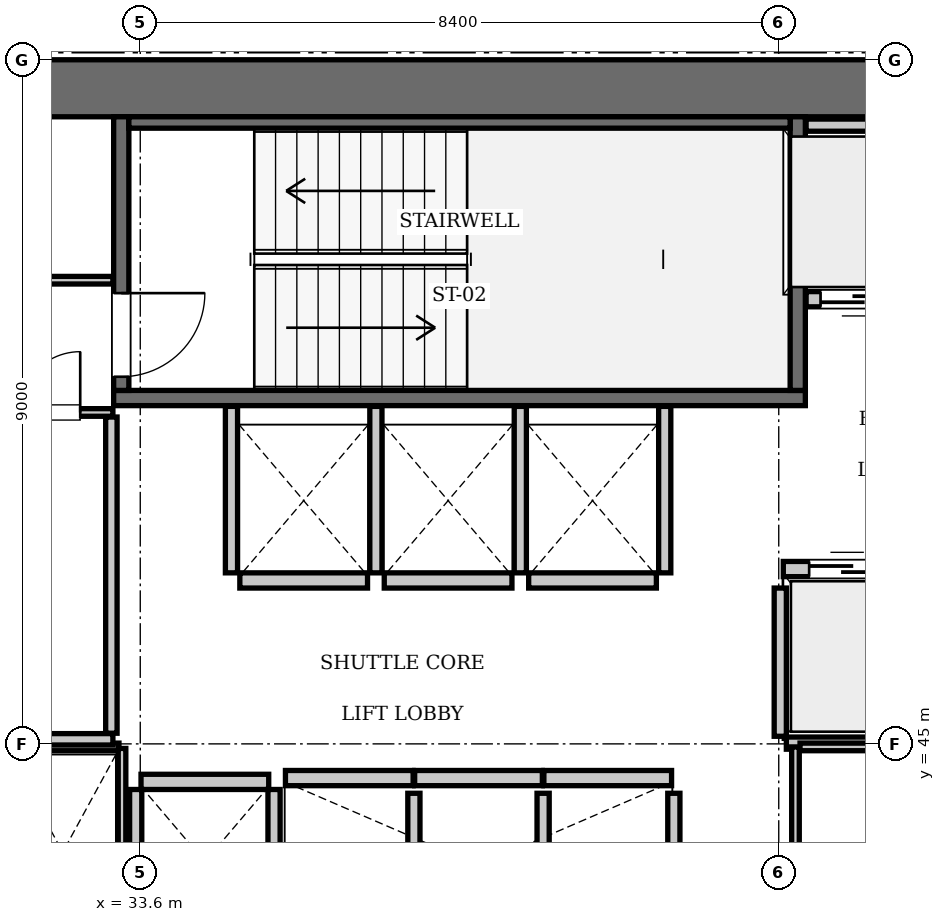
"""IFC4 building model, lengths in metres.
Left out: names, types, materials, properties, quantities, classifications, styles, units other than length and angle.
Written with IfcOpenShell. Run it as: python <this file> out.ifc"""

import sys

from ifc_helpers import new_model, si_unit, direction, frame, frame_2d, origin, place, context, subcontext, project, spatial, rectangle, extrude, element, fill, save


model = new_model("IFC4")
c1 = context("Model", 3, precision=1e-05, world=origin(), true_north=direction((0.0, 1.0)))
c2 = subcontext(c1, "Body", "Model", "MODEL_VIEW")
j1 = project(units=[si_unit("LENGTHUNIT", "METRE"), si_unit("PLANEANGLEUNIT", "RADIAN")], contexts=[c1])
p1 = place(None, origin())
s1 = spatial("IfcSite", under=j1, at=p1, CompositionType="ELEMENT")
p2 = place(p1, origin())
s2 = spatial("IfcBuilding", under=s1, at=p2, CompositionType="ELEMENT")
p3 = place(p2, frame((0.0, 0.0, 142.8)))
s3 = spatial("IfcBuildingStorey", under=s2, at=p3, CompositionType="ELEMENT", Elevation=142.8)
p4 = place(p3, frame((25.2, 53.625, 0.0), z_axis=(0.0, 0.0, 1.0), x_axis=(1.0, 0.0, 0.0)))
e1 = element("IfcWall", 1, at=p4, inside=s3, PredefinedType="SHEAR", context=c2, shape_type="SweptSolid", body=[
    extrude(rectangle(XDim=25.2, YDim=0.75, at=frame_2d((12.6, 0.0))), origin(), (0.0, 0.0, 1.0), 3.85),
])
p5 = place(p3, frame((33.25, 49.55, 0.0), z_axis=(0.0, 0.0, 1.0), x_axis=(1.0, 0.0, 0.0)))
e2 = element("IfcWall", 2, at=p5, inside=s3, PredefinedType="SOLIDWALL", context=c2, shape_type="SweptSolid", body=[
    extrude(rectangle(XDim=9.1, YDim=0.2, at=frame_2d((4.55, 0.0))), origin(), (0.0, 0.0, 1.0), 3.61),
])
p6 = place(p3, frame((42.25, 49.65, 0.0), z_axis=(0.0, 0.0, 1.0), x_axis=(0.0, 1.0, 0.0)))
e3 = element("IfcWall", 3, at=p6, inside=s3, PredefinedType="SOLIDWALL", context=c2, shape_type="SweptSolid", body=[
    extrude(rectangle(XDim=3.6, YDim=0.2, at=frame_2d((1.8, 0.0))), origin(), (0.0, 0.0, 1.0), 3.61),
])
p7 = place(p3, frame((33.35, 49.65, 0.0), z_axis=(0.0, 0.0, 1.0), x_axis=(0.0, 1.0, 0.0)))
e4 = element("IfcWall", 4, at=p7, inside=s3, PredefinedType="SOLIDWALL", context=c2, shape_type="SweptSolid", body=[
    extrude(rectangle(XDim=3.6, YDim=0.2, at=frame_2d((1.8, 0.0))), origin(), (0.0, 0.0, 1.0), 3.61),
])
p8 = place(p7, frame((0.18, 0.0, 0.0)))
e5 = element("IfcOpeningElement", 5, at=p8, cuts=e4, PredefinedType="OPENING", context=c2, shape_type="SweptSolid", body=[
    extrude(rectangle(XDim=1.1, YDim=2.15, at=frame_2d((0.55, 1.075))), frame((0.0, 0.11, 0.0), z_axis=(0.0, -1.0, 0.0), x_axis=(1.0, 0.0, 0.0)), (0.0, 0.0, 1.0), 0.22),
])
p9 = place(p3, frame((33.45, 53.175, 0.0), z_axis=(0.0, 0.0, 1.0), x_axis=(1.0, 0.0, 0.0)))
e6 = element("IfcWall", 6, at=p9, inside=s3, PredefinedType="SOLIDWALL", context=c2, shape_type="SweptSolid", body=[
    extrude(rectangle(XDim=8.7, YDim=0.15, at=frame_2d((4.35, 0.0))), origin(), (0.0, 0.0, 1.0), 3.61),
])
p10 = place(p3, frame((42.06, 47.3, 0.0), z_axis=(0.0, 0.0, 1.0), x_axis=(1.0, 0.0, 0.0)))
e7 = element("IfcWall", 7, at=p10, inside=s3, PredefinedType="SOLIDWALL", context=c2, shape_type="SweptSolid", body=[
    extrude(rectangle(XDim=1.68, YDim=0.2, at=frame_2d((0.84, 0.0))), origin(), (0.0, 0.0, 1.0), 3.61),
])
p11 = place(p10, frame((0.34, 0.0, 0.0)))
e8 = element("IfcOpeningElement", 8, at=p11, cuts=e7, PredefinedType="OPENING", context=c2, shape_type="SweptSolid", body=[
    extrude(rectangle(XDim=1.0, YDim=2.15, at=frame_2d((0.5, 1.075))), frame((0.0, 0.11, 0.0), z_axis=(0.0, -1.0, 0.0), x_axis=(1.0, 0.0, 0.0)), (0.0, 0.0, 1.0), 0.22),
])
p12 = place(p3, frame((42.36, 50.85, 0.0), z_axis=(0.0, 0.0, 1.0), x_axis=(1.0, 0.0, 0.0)))
e9 = element("IfcWall", 9, at=p12, inside=s3, PredefinedType="SOLIDWALL", context=c2, shape_type="SweptSolid", body=[
    extrude(rectangle(XDim=1.38, YDim=0.2, at=frame_2d((0.69, 0.0))), origin(), (0.0, 0.0, 1.0), 3.61),
])
p13 = place(p12, frame((0.19, 0.0, 0.0)))
e10 = element("IfcOpeningElement", 10, at=p13, cuts=e9, PredefinedType="OPENING", context=c2, shape_type="SweptSolid", body=[
    extrude(rectangle(XDim=1.0, YDim=2.15, at=frame_2d((0.5, 1.075))), frame((0.0, 0.11, 0.0), z_axis=(0.0, -1.0, 0.0), x_axis=(1.0, 0.0, 0.0)), (0.0, 0.0, 1.0), 0.22),
])
for number, where, z_axis, x_axis in (
    (11, (35.51, 44.55, 0.0), (0.0, 0.0, 1.0), (1.0, 0.0, 0.0)),
    (12, (37.21, 44.55, 0.0), (0.0, 0.0, 1.0), (1.0, 0.0, 0.0)),
):
    element("IfcWall", number, at=place(p3, frame(where, z_axis=z_axis, x_axis=x_axis)), inside=s3, PredefinedType="SOLIDWALL", context=c2, shape_type="SweptSolid", body=[
        extrude(rectangle(XDim=1.68, YDim=0.2, at=frame_2d((0.84, 0.0))), origin(), (0.0, 0.0, 1.0), 3.61),
    ])
for number, where, z_axis, x_axis in (
    (13, (38.91, 44.55, 0.0), (0.0, 0.0, 1.0), (1.0, 0.0, 0.0)),
    (14, (34.91, 47.15, 0.0), (0.0, 0.0, 1.0), (1.0, 0.0, 0.0)),
):
    element("IfcWall", number, at=place(p3, frame(where, z_axis=z_axis, x_axis=x_axis)), inside=s3, PredefinedType="SOLIDWALL", context=c2, shape_type="SweptSolid", body=[
        extrude(rectangle(XDim=1.68, YDim=0.2, at=frame_2d((0.84, 0.0))), origin(), (0.0, 0.0, 1.0), 3.61),
    ])
for number, where, z_axis, x_axis in (
    (15, (36.81, 47.15, 0.0), (0.0, 0.0, 1.0), (1.0, 0.0, 0.0)),
    (16, (38.71, 47.15, 0.0), (0.0, 0.0, 1.0), (1.0, 0.0, 0.0)),
    (17, (33.61, 44.5, 0.0), (0.0, 0.0, 1.0), (1.0, 0.0, 0.0)),
):
    element("IfcWall", number, at=place(p3, frame(where, z_axis=z_axis, x_axis=x_axis)), inside=s3, PredefinedType="SOLIDWALL", context=c2, shape_type="SweptSolid", body=[
        extrude(rectangle(XDim=1.68, YDim=0.2, at=frame_2d((0.84, 0.0))), origin(), (0.0, 0.0, 1.0), 3.61),
    ])
p14 = place(p3, frame((42.02, 45.1, 0.0), z_axis=(0.0, 0.0, 1.0), x_axis=(0.0, 1.0, 0.0)))
e18 = element("IfcWall", 18, at=p14, inside=s3, PredefinedType="SOLIDWALL", context=c2, shape_type="SweptSolid", body=[
    extrude(rectangle(XDim=1.95, YDim=0.16, at=frame_2d((0.975, 0.0))), origin(), (0.0, 0.0, 1.0), 3.61),
])
p15 = place(p3, frame((42.1, 45.01, 0.0), z_axis=(0.0, 0.0, 1.0), x_axis=(1.0, 0.0, 0.0)))
e19 = element("IfcWall", 19, at=p15, inside=s3, PredefinedType="SOLIDWALL", context=c2, shape_type="SweptSolid", body=[
    extrude(rectangle(XDim=3.45, YDim=0.16, at=frame_2d((1.725, 0.0))), origin(), (0.0, 0.0, 1.0), 3.61),
])
p16 = place(p3, frame((42.36, 53.14, 0.0), z_axis=(0.0, 0.0, 1.0), x_axis=(1.0, 0.0, 0.0)))
e20 = element("IfcWall", 20, at=p16, inside=s3, PredefinedType="SOLIDWALL", context=c2, shape_type="SweptSolid", body=[
    extrude(rectangle(XDim=3.14, YDim=0.16, at=frame_2d((1.57, 0.0))), origin(), (0.0, 0.0, 1.0), 3.61),
])
for number, where, z_axis, x_axis in (
    (21, (37.2, 42.15, 0.0), (0.0, 0.0, 1.0), (0.0, 1.0, 0.0)),
    (22, (38.9, 42.15, 0.0), (0.0, 0.0, 1.0), (0.0, 1.0, 0.0)),
    (23, (40.62, 42.15, 0.0), (0.0, 0.0, 1.0), (0.0, 1.0, 0.0)),
):
    element("IfcWall", number, at=place(p3, frame(where, z_axis=z_axis, x_axis=x_axis)), inside=s3, PredefinedType="SOLIDWALL", context=c2, shape_type="SweptSolid", body=[
        extrude(rectangle(XDim=2.2, YDim=0.16, at=frame_2d((1.1, 0.0))), origin(), (0.0, 0.0, 1.0), 3.61),
    ])
for number, where, z_axis, x_axis in (
    (24, (34.8, 47.25, 0.0), (0.0, 0.0, 1.0), (0.0, 1.0, 0.0)),
    (25, (36.7, 47.25, 0.0), (0.0, 0.0, 1.0), (0.0, 1.0, 0.0)),
    (26, (38.6, 47.25, 0.0), (0.0, 0.0, 1.0), (0.0, 1.0, 0.0)),
    (27, (40.5, 47.25, 0.0), (0.0, 0.0, 1.0), (0.0, 1.0, 0.0)),
):
    element("IfcWall", number, at=place(p3, frame(where, z_axis=z_axis, x_axis=x_axis)), inside=s3, PredefinedType="SOLIDWALL", context=c2, shape_type="SweptSolid", body=[
        extrude(rectangle(XDim=2.19, YDim=0.16, at=frame_2d((1.095, 0.0))), origin(), (0.0, 0.0, 1.0), 3.61),
    ])
for number, where, z_axis, x_axis in (
    (28, (33.54, 42.15, 0.0), (0.0, 0.0, 1.0), (0.0, 1.0, 0.0)),
    (29, (35.36, 42.15, 0.0), (0.0, 0.0, 1.0), (0.0, 1.0, 0.0)),
):
    element("IfcWall", number, at=place(p3, frame(where, z_axis=z_axis, x_axis=x_axis)), inside=s3, PredefinedType="SOLIDWALL", context=c2, shape_type="SweptSolid", body=[
        extrude(rectangle(XDim=2.25, YDim=0.16, at=frame_2d((1.125, 0.0))), origin(), (0.0, 0.0, 1.0), 3.61),
    ])
p17 = place(p3, frame((31.84, 44.96, 0.0), z_axis=(0.0, 0.0, 1.0), x_axis=(1.0, 0.0, 0.0)))
e30 = element("IfcWall", 30, at=p17, inside=s3, PredefinedType="PARTITIONING", context=c2, shape_type="SweptSolid", body=[
    extrude(rectangle(XDim=1.48, YDim=0.1, at=frame_2d((0.74, 0.0))), origin(), (0.0, 0.0, 1.0), 3.61),
])
p18 = place(p3, frame((33.36, 42.21, 0.0), z_axis=(0.0, 0.0, 1.0), x_axis=(0.0, 1.0, 0.0)))
e31 = element("IfcWall", 31, at=p18, inside=s3, PredefinedType="PARTITIONING", context=c2, shape_type="SweptSolid", body=[
    extrude(rectangle(XDim=2.73, YDim=0.1, at=frame_2d((1.365, 0.0))), origin(), (0.0, 0.0, 1.0), 3.61),
])
p19 = place(p3, frame((42.22, 42.2, 0.0), z_axis=(0.0, 0.0, 1.0), x_axis=(0.0, 1.0, 0.0)))
e32 = element("IfcWall", 32, at=p19, inside=s3, PredefinedType="PARTITIONING", context=c2, shape_type="SweptSolid", body=[
    extrude(rectangle(XDim=2.76, YDim=0.1, at=frame_2d((1.38, 0.0))), origin(), (0.0, 0.0, 1.0), 3.61),
])
p20 = place(p19, frame((0.65, 0.0, 0.0)))
e33 = element("IfcOpeningElement", 33, at=p20, cuts=e32, PredefinedType="OPENING", context=c2, shape_type="SweptSolid", body=[
    extrude(rectangle(XDim=0.8, YDim=2.05, at=frame_2d((0.4, 1.025))), frame((0.0, 0.06, 0.0), z_axis=(0.0, -1.0, 0.0), x_axis=(1.0, 0.0, 0.0)), (0.0, 0.0, 1.0), 0.12),
])
p21 = place(p3, frame((42.28, 44.96, 0.0), z_axis=(0.0, 0.0, 1.0), x_axis=(1.0, 0.0, 0.0)))
e34 = element("IfcWall", 34, at=p21, inside=s3, PredefinedType="PARTITIONING", context=c2, shape_type="SweptSolid", body=[
    extrude(rectangle(XDim=1.3, YDim=0.1, at=frame_2d((0.65, 0.0))), origin(), (0.0, 0.0, 1.0), 3.61),
])
p22 = place(p3, frame((30.06, 45.06, 0.0), z_axis=(0.0, 0.0, 1.0), x_axis=(1.0, 0.0, 0.0)))
e35 = element("IfcWall", 35, at=p22, inside=s3, PredefinedType="PARTITIONING", context=c2, shape_type="SweptSolid", body=[
    extrude(rectangle(XDim=3.18, YDim=0.15, at=frame_2d((1.59, 0.0))), origin(), (0.0, 0.0, 1.0), 3.61),
])
p23 = place(p3, frame((33.22, 45.14, 0.0), z_axis=(0.0, 0.0, 1.0), x_axis=(0.0, 1.0, 0.0)))
e36 = element("IfcWall", 36, at=p23, inside=s3, PredefinedType="PARTITIONING", context=c2, shape_type="SweptSolid", body=[
    extrude(rectangle(XDim=4.16, YDim=0.15, at=frame_2d((2.08, 0.0))), origin(), (0.0, 0.0, 1.0), 3.61),
])
p24 = place(p3, frame((30.06, 49.36, 0.0), z_axis=(0.0, 0.0, 1.0), x_axis=(1.0, 0.0, 0.0)))
e37 = element("IfcWall", 37, at=p24, inside=s3, PredefinedType="PARTITIONING", context=c2, shape_type="SweptSolid", body=[
    extrude(rectangle(XDim=3.18, YDim=0.1, at=frame_2d((1.59, 0.0))), origin(), (0.0, 0.0, 1.0), 3.61),
])
p25 = place(p24, frame((1.95, 0.0, 0.0)))
e38 = element("IfcOpeningElement", 38, at=p25, cuts=e37, PredefinedType="OPENING", context=c2, shape_type="SweptSolid", body=[
    extrude(rectangle(XDim=0.8, YDim=2.05, at=frame_2d((0.4, 1.025))), frame((0.0, 0.06, 0.0), z_axis=(0.0, -1.0, 0.0), x_axis=(1.0, 0.0, 0.0)), (0.0, 0.0, 1.0), 0.12),
])
p26 = place(p3, frame((31.82, 51.1, 0.0), z_axis=(0.0, 0.0, 1.0), x_axis=(1.0, 0.0, 0.0)))
e39 = element("IfcWall", 39, at=p26, inside=s3, PredefinedType="PARTITIONING", context=c2, shape_type="SweptSolid", body=[
    extrude(rectangle(XDim=1.42, YDim=0.1, at=frame_2d((0.71, 0.0))), origin(), (0.0, 0.0, 1.0), 3.61),
])
p27 = place(p8, frame((1.1, 0.0, 0.0), z_axis=(0.0, 0.0, 1.0), x_axis=(-1.0, 0.0, 0.0)))
e40 = element("IfcDoor", 40, at=p27, inside=s3, OperationType="SINGLE_SWING_LEFT", PredefinedType="DOOR", context=c2, shape_type="SweptSolid", body=[
    extrude(rectangle(XDim=1.1, YDim=2.15, at=frame_2d((0.55, 1.075))), frame((0.0, 0.025, 0.0), z_axis=(0.0, -1.0, 0.0), x_axis=(1.0, 0.0, 0.0)), (0.0, 0.0, 1.0), 0.05),
])
fill(e5, e40)
p28 = place(p11, origin())
e41 = element("IfcDoor", 41, at=p28, inside=s3, OperationType="SLIDING_TO_LEFT", PredefinedType="DOOR", context=c2, shape_type="SweptSolid", body=[
    extrude(rectangle(XDim=1.0, YDim=2.15, at=frame_2d((0.5, 1.075))), frame((0.0, 0.025, 0.0), z_axis=(0.0, -1.0, 0.0), x_axis=(1.0, 0.0, 0.0)), (0.0, 0.0, 1.0), 0.05),
])
fill(e8, e41)
p29 = place(p13, frame((1.0, 0.0, 0.0), z_axis=(0.0, 0.0, 1.0), x_axis=(-1.0, 0.0, 0.0)))
e42 = element("IfcDoor", 42, at=p29, inside=s3, OperationType="SLIDING_TO_LEFT", PredefinedType="DOOR", context=c2, shape_type="SweptSolid", body=[
    extrude(rectangle(XDim=1.0, YDim=2.15, at=frame_2d((0.5, 1.075))), frame((0.0, 0.025, 0.0), z_axis=(0.0, -1.0, 0.0), x_axis=(1.0, 0.0, 0.0)), (0.0, 0.0, 1.0), 0.05),
])
fill(e10, e42)
p30 = place(p25, origin())
e43 = element("IfcDoor", 43, at=p30, inside=s3, OperationType="SINGLE_SWING_RIGHT", PredefinedType="DOOR", context=c2, shape_type="SweptSolid", body=[
    extrude(rectangle(XDim=0.8, YDim=2.05, at=frame_2d((0.4, 1.025))), frame((0.0, 0.025, 0.0), z_axis=(0.0, -1.0, 0.0), x_axis=(1.0, 0.0, 0.0)), (0.0, 0.0, 1.0), 0.05),
])
fill(e38, e43)
save(model, sys.argv[1])
